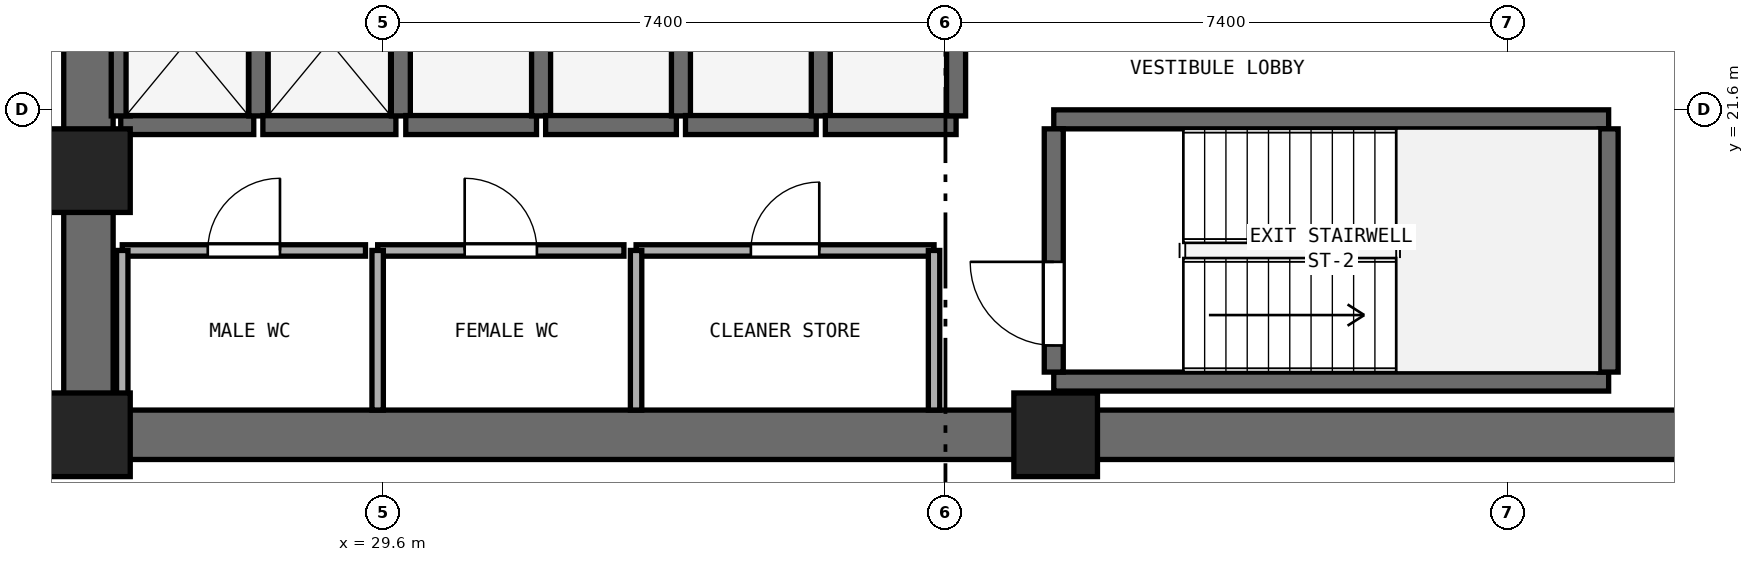
"""IFC4 building model, lengths in metres.
Left out: names, types, materials, properties, quantities, classifications, styles, units other than length and angle.
Written with IfcOpenShell. Run it as: python <this file> out.ifc"""

import sys

from ifc_helpers import new_model, si_unit, direction, frame, frame_2d, origin, origin_2d, place, context, subcontext, project, spatial, rectangle, extrude, element, fill, save


model = new_model("IFC4")
c1 = context("Model", 3, precision=1e-05, world=origin(), true_north=direction((0.0, 1.0)))
c2 = subcontext(c1, "Body", "Model", "MODEL_VIEW")
j1 = project(units=[si_unit("LENGTHUNIT", "METRE"), si_unit("PLANEANGLEUNIT", "RADIAN")], contexts=[c1])
p1 = place(None, origin())
s1 = spatial("IfcSite", under=j1, at=p1, CompositionType="ELEMENT")
p2 = place(p1, origin())
s2 = spatial("IfcBuilding", under=s1, at=p2, CompositionType="ELEMENT")
p3 = place(p2, frame((0.0, 0.0, 116.2)))
s3 = spatial("IfcBuildingStorey", under=s2, at=p3, CompositionType="ELEMENT", Elevation=116.2)
p4 = place(p3, frame((25.4, 17.325, 0.0), z_axis=(0.0, 0.0, 1.0), x_axis=(1.0, 0.0, 0.0)))
e1 = element("IfcWall", 1, at=p4, inside=s3, PredefinedType="SHEAR", context=c2, shape_type="SweptSolid", body=[
    extrude(rectangle(XDim=23.2, YDim=0.65, at=frame_2d((11.6, 0.0))), origin(), (0.0, 0.0, 1.0), 3.4),
])
p5 = place(p3, frame((25.725, 17.65, 0.0), z_axis=(0.0, 0.0, 1.0), x_axis=(0.0, 1.0, 0.0)))
e2 = element("IfcWall", 2, at=p5, inside=s3, PredefinedType="SHEAR", context=c2, shape_type="SweptSolid", body=[
    extrude(rectangle(XDim=15.1, YDim=0.65, at=frame_2d((7.55, 0.0))), origin(), (0.0, 0.0, 1.0), 3.4),
])
p6 = place(p5, frame((6.8, 0.0, 0.0)))
e3 = element("IfcOpeningElement", 3, at=p6, cuts=e2, PredefinedType="OPENING", context=c2, shape_type="SweptSolid", body=[
    extrude(rectangle(XDim=1.5, YDim=2.15, at=frame_2d((0.75, 1.075))), frame((0.0, 0.335, 0.0), z_axis=(0.0, -1.0, 0.0), x_axis=(1.0, 0.0, 0.0)), (0.0, 0.0, 1.0), 0.67),
])
for number, where, z_axis, x_axis in (
    (4, (25.725, 17.325, 0.0), (0.0, 0.0, 1.0), (1.0, 0.0, 0.0)),
    (5, (38.45, 17.325, 0.0), (0.0, 0.0, 1.0), (1.0, 0.0, 0.0)),
    (6, (25.725, 20.8, 0.0), (0.0, 0.0, 1.0), (1.0, 0.0, 0.0)),
):
    element("IfcColumn", number, at=place(p3, frame(where, z_axis=z_axis, x_axis=x_axis)), inside=s3, PredefinedType="PILASTER", context=c2, shape_type="SweptSolid", body=[
        extrude(rectangle(XDim=1.1, YDim=1.1, at=origin_2d()), origin(), (0.0, 0.0, 1.0), 3.8),
    ])
for number, where, z_axis, x_axis in (
    (7, (38.425, 18.025, 0.0), (0.0, 0.0, 1.0), (1.0, 0.0, 0.0)),
    (8, (38.425, 21.475, 0.0), (0.0, 0.0, 1.0), (1.0, 0.0, 0.0)),
):
    element("IfcWall", number, at=place(p3, frame(where, z_axis=z_axis, x_axis=x_axis)), inside=s3, PredefinedType="SHEAR", context=c2, shape_type="SweptSolid", body=[
        extrude(rectangle(XDim=7.3, YDim=0.25, at=frame_2d((3.65, 0.0))), origin(), (0.0, 0.0, 1.0), 3.4),
    ])
p7 = place(p3, frame((38.425, 18.15, 0.0), z_axis=(0.0, 0.0, 1.0), x_axis=(0.0, 1.0, 0.0)))
e9 = element("IfcWall", 9, at=p7, inside=s3, PredefinedType="SHEAR", context=c2, shape_type="SweptSolid", body=[
    extrude(rectangle(XDim=3.2, YDim=0.25, at=frame_2d((1.6, 0.0))), origin(), (0.0, 0.0, 1.0), 3.4),
])
p8 = place(p7, frame((0.35, 0.0, 0.0)))
e10 = element("IfcOpeningElement", 10, at=p8, cuts=e9, PredefinedType="OPENING", context=c2, shape_type="SweptSolid", body=[
    extrude(rectangle(XDim=1.1, YDim=2.15, at=frame_2d((0.55, 1.075))), frame((0.0, 0.135, 0.0), z_axis=(0.0, -1.0, 0.0), x_axis=(1.0, 0.0, 0.0)), (0.0, 0.0, 1.0), 0.27),
])
p9 = place(p3, frame((45.725, 18.15, 0.0), z_axis=(0.0, 0.0, 1.0), x_axis=(0.0, 1.0, 0.0)))
e11 = element("IfcWall", 11, at=p9, inside=s3, PredefinedType="SHEAR", context=c2, shape_type="SweptSolid", body=[
    extrude(rectangle(XDim=3.2, YDim=0.25, at=frame_2d((1.6, 0.0))), origin(), (0.0, 0.0, 1.0), 3.4),
])
p10 = place(p3, frame((26.15, 21.4, 0.0), z_axis=(0.0, 0.0, 1.0), x_axis=(1.0, 0.0, 0.0)))
e12 = element("IfcWall", 12, at=p10, inside=s3, PredefinedType="SHEAR", context=c2, shape_type="SweptSolid", body=[
    extrude(rectangle(XDim=1.75, YDim=0.25, at=frame_2d((0.875, 0.0))), origin(), (0.0, 0.0, 1.0), 3.4),
])
for number, where, z_axis, x_axis in (
    (13, (26.15, 21.52, 0.0), (0.0, 0.0, 1.0), (0.0, 1.0, 0.0)),
    (14, (27.96, 21.52, 0.0), (0.0, 0.0, 1.0), (0.0, 1.0, 0.0)),
):
    element("IfcWall", number, at=place(p3, frame(where, z_axis=z_axis, x_axis=x_axis)), inside=s3, PredefinedType="SHEAR", context=c2, shape_type="SweptSolid", body=[
        extrude(rectangle(XDim=1.96, YDim=0.25, at=frame_2d((0.98, 0.0))), origin(), (0.0, 0.0, 1.0), 3.4),
    ])
p11 = place(p3, frame((28.02, 21.4, 0.0), z_axis=(0.0, 0.0, 1.0), x_axis=(1.0, 0.0, 0.0)))
e15 = element("IfcWall", 15, at=p11, inside=s3, PredefinedType="SHEAR", context=c2, shape_type="SweptSolid", body=[
    extrude(rectangle(XDim=1.75, YDim=0.25, at=frame_2d((0.875, 0.0))), origin(), (0.0, 0.0, 1.0), 3.4),
])
p12 = place(p3, frame((29.835, 21.52, 0.0), z_axis=(0.0, 0.0, 1.0), x_axis=(0.0, 1.0, 0.0)))
e16 = element("IfcWall", 16, at=p12, inside=s3, PredefinedType="SHEAR", context=c2, shape_type="SweptSolid", body=[
    extrude(rectangle(XDim=1.96, YDim=0.25, at=frame_2d((0.98, 0.0))), origin(), (0.0, 0.0, 1.0), 3.4),
])
p13 = place(p3, frame((29.9, 21.4, 0.0), z_axis=(0.0, 0.0, 1.0), x_axis=(1.0, 0.0, 0.0)))
e17 = element("IfcWall", 17, at=p13, inside=s3, PredefinedType="SHEAR", context=c2, shape_type="SweptSolid", body=[
    extrude(rectangle(XDim=1.72, YDim=0.25, at=frame_2d((0.86, 0.0))), origin(), (0.0, 0.0, 1.0), 3.4),
])
p14 = place(p3, frame((31.68, 21.52, 0.0), z_axis=(0.0, 0.0, 1.0), x_axis=(0.0, 1.0, 0.0)))
e18 = element("IfcWall", 18, at=p14, inside=s3, PredefinedType="SHEAR", context=c2, shape_type="SweptSolid", body=[
    extrude(rectangle(XDim=1.96, YDim=0.25, at=frame_2d((0.98, 0.0))), origin(), (0.0, 0.0, 1.0), 3.4),
])
p15 = place(p3, frame((31.74, 21.4, 0.0), z_axis=(0.0, 0.0, 1.0), x_axis=(1.0, 0.0, 0.0)))
e19 = element("IfcWall", 19, at=p15, inside=s3, PredefinedType="SHEAR", context=c2, shape_type="SweptSolid", body=[
    extrude(rectangle(XDim=1.72, YDim=0.25, at=frame_2d((0.86, 0.0))), origin(), (0.0, 0.0, 1.0), 3.4),
])
p16 = place(p3, frame((33.52, 21.52, 0.0), z_axis=(0.0, 0.0, 1.0), x_axis=(0.0, 1.0, 0.0)))
e20 = element("IfcWall", 20, at=p16, inside=s3, PredefinedType="SHEAR", context=c2, shape_type="SweptSolid", body=[
    extrude(rectangle(XDim=1.96, YDim=0.25, at=frame_2d((0.98, 0.0))), origin(), (0.0, 0.0, 1.0), 3.4),
])
p17 = place(p3, frame((33.58, 21.4, 0.0), z_axis=(0.0, 0.0, 1.0), x_axis=(1.0, 0.0, 0.0)))
e21 = element("IfcWall", 21, at=p17, inside=s3, PredefinedType="SHEAR", context=c2, shape_type="SweptSolid", body=[
    extrude(rectangle(XDim=1.72, YDim=0.25, at=frame_2d((0.86, 0.0))), origin(), (0.0, 0.0, 1.0), 3.4),
])
p18 = place(p3, frame((35.36, 21.52, 0.0), z_axis=(0.0, 0.0, 1.0), x_axis=(0.0, 1.0, 0.0)))
e22 = element("IfcWall", 22, at=p18, inside=s3, PredefinedType="SHEAR", context=c2, shape_type="SweptSolid", body=[
    extrude(rectangle(XDim=1.96, YDim=0.25, at=frame_2d((0.98, 0.0))), origin(), (0.0, 0.0, 1.0), 3.4),
])
p19 = place(p3, frame((35.42, 21.4, 0.0), z_axis=(0.0, 0.0, 1.0), x_axis=(1.0, 0.0, 0.0)))
e23 = element("IfcWall", 23, at=p19, inside=s3, PredefinedType="SHEAR", context=c2, shape_type="SweptSolid", body=[
    extrude(rectangle(XDim=1.72, YDim=0.25, at=frame_2d((0.86, 0.0))), origin(), (0.0, 0.0, 1.0), 3.4),
])
p20 = place(p3, frame((37.14, 21.52, 0.0), z_axis=(0.0, 0.0, 1.0), x_axis=(0.0, 1.0, 0.0)))
e24 = element("IfcWall", 24, at=p20, inside=s3, PredefinedType="SHEAR", context=c2, shape_type="SweptSolid", body=[
    extrude(rectangle(XDim=1.96, YDim=0.25, at=frame_2d((0.98, 0.0))), origin(), (0.0, 0.0, 1.0), 3.4),
])
p21 = place(p3, frame((26.17, 19.75, 0.0), z_axis=(0.0, 0.0, 1.0), x_axis=(1.0, 0.0, 0.0)))
e25 = element("IfcWall", 25, at=p21, inside=s3, PredefinedType="PARTITIONING", context=c2, shape_type="SweptSolid", body=[
    extrude(rectangle(XDim=3.2, YDim=0.15, at=frame_2d((1.6, 0.0))), origin(), (0.0, 0.0, 1.0), 3.4),
])
p22 = place(p21, frame((1.125, 0.0, 0.0)))
e26 = element("IfcOpeningElement", 26, at=p22, cuts=e25, PredefinedType="OPENING", context=c2, shape_type="SweptSolid", body=[
    extrude(rectangle(XDim=0.95, YDim=2.1, at=frame_2d((0.475, 1.05))), frame((0.0, 0.085, 0.0), z_axis=(0.0, -1.0, 0.0), x_axis=(1.0, 0.0, 0.0)), (0.0, 0.0, 1.0), 0.17),
])
p23 = place(p3, frame((26.17, 17.65, 0.0), z_axis=(0.0, 0.0, 1.0), x_axis=(0.0, 1.0, 0.0)))
e27 = element("IfcWall", 27, at=p23, inside=s3, PredefinedType="PARTITIONING", context=c2, shape_type="SweptSolid", body=[
    extrude(rectangle(XDim=2.1, YDim=0.15, at=frame_2d((1.05, 0.0))), origin(), (0.0, 0.0, 1.0), 3.4),
])
p24 = place(p3, frame((29.53, 19.75, 0.0), z_axis=(0.0, 0.0, 1.0), x_axis=(1.0, 0.0, 0.0)))
e28 = element("IfcWall", 28, at=p24, inside=s3, PredefinedType="PARTITIONING", context=c2, shape_type="SweptSolid", body=[
    extrude(rectangle(XDim=3.24, YDim=0.15, at=frame_2d((1.62, 0.0))), origin(), (0.0, 0.0, 1.0), 3.4),
])
p25 = place(p24, frame((1.145, 0.0, 0.0)))
e29 = element("IfcOpeningElement", 29, at=p25, cuts=e28, PredefinedType="OPENING", context=c2, shape_type="SweptSolid", body=[
    extrude(rectangle(XDim=0.95, YDim=2.1, at=frame_2d((0.475, 1.05))), frame((0.0, 0.085, 0.0), z_axis=(0.0, -1.0, 0.0), x_axis=(1.0, 0.0, 0.0)), (0.0, 0.0, 1.0), 0.17),
])
p26 = place(p3, frame((29.53, 17.65, 0.0), z_axis=(0.0, 0.0, 1.0), x_axis=(0.0, 1.0, 0.0)))
e30 = element("IfcWall", 30, at=p26, inside=s3, PredefinedType="PARTITIONING", context=c2, shape_type="SweptSolid", body=[
    extrude(rectangle(XDim=2.1, YDim=0.15, at=frame_2d((1.05, 0.0))), origin(), (0.0, 0.0, 1.0), 3.4),
])
p27 = place(p3, frame((32.93, 19.75, 0.0), z_axis=(0.0, 0.0, 1.0), x_axis=(1.0, 0.0, 0.0)))
e31 = element("IfcWall", 31, at=p27, inside=s3, PredefinedType="PARTITIONING", context=c2, shape_type="SweptSolid", body=[
    extrude(rectangle(XDim=3.92, YDim=0.15, at=frame_2d((1.96, 0.0))), origin(), (0.0, 0.0, 1.0), 3.4),
])
p28 = place(p27, frame((1.51, 0.0, 0.0)))
e32 = element("IfcOpeningElement", 32, at=p28, cuts=e31, PredefinedType="OPENING", context=c2, shape_type="SweptSolid", body=[
    extrude(rectangle(XDim=0.9, YDim=2.1, at=frame_2d((0.45, 1.05))), frame((0.0, 0.085, 0.0), z_axis=(0.0, -1.0, 0.0), x_axis=(1.0, 0.0, 0.0)), (0.0, 0.0, 1.0), 0.17),
])
for number, where, z_axis, x_axis in (
    (33, (32.93, 17.65, 0.0), (0.0, 0.0, 1.0), (0.0, 1.0, 0.0)),
    (34, (36.85, 17.65, 0.0), (0.0, 0.0, 1.0), (0.0, 1.0, 0.0)),
):
    element("IfcWall", number, at=place(p3, frame(where, z_axis=z_axis, x_axis=x_axis)), inside=s3, PredefinedType="PARTITIONING", context=c2, shape_type="SweptSolid", body=[
        extrude(rectangle(XDim=2.1, YDim=0.15, at=frame_2d((1.05, 0.0))), origin(), (0.0, 0.0, 1.0), 3.4),
    ])
p29 = place(p8, origin())
e35 = element("IfcDoor", 35, at=p29, inside=s3, OperationType="SINGLE_SWING_RIGHT", PredefinedType="DOOR", context=c2, shape_type="SweptSolid", body=[
    extrude(rectangle(XDim=1.1, YDim=2.15, at=frame_2d((0.55, 1.075))), frame((0.0, 0.025, 0.0), z_axis=(0.0, -1.0, 0.0), x_axis=(1.0, 0.0, 0.0)), (0.0, 0.0, 1.0), 0.05),
])
fill(e10, e35)
p30 = place(p22, origin())
e36 = element("IfcDoor", 36, at=p30, inside=s3, OperationType="SINGLE_SWING_RIGHT", PredefinedType="DOOR", context=c2, shape_type="SweptSolid", body=[
    extrude(rectangle(XDim=0.95, YDim=2.1, at=frame_2d((0.475, 1.05))), frame((0.0, 0.025, 0.0), z_axis=(0.0, -1.0, 0.0), x_axis=(1.0, 0.0, 0.0)), (0.0, 0.0, 1.0), 0.05),
])
fill(e26, e36)
p31 = place(p25, origin())
e37 = element("IfcDoor", 37, at=p31, inside=s3, OperationType="SINGLE_SWING_LEFT", PredefinedType="DOOR", context=c2, shape_type="SweptSolid", body=[
    extrude(rectangle(XDim=0.95, YDim=2.1, at=frame_2d((0.475, 1.05))), frame((0.0, 0.025, 0.0), z_axis=(0.0, -1.0, 0.0), x_axis=(1.0, 0.0, 0.0)), (0.0, 0.0, 1.0), 0.05),
])
fill(e29, e37)
p32 = place(p28, origin())
e38 = element("IfcDoor", 38, at=p32, inside=s3, OperationType="SINGLE_SWING_RIGHT", PredefinedType="DOOR", context=c2, shape_type="SweptSolid", body=[
    extrude(rectangle(XDim=0.9, YDim=2.1, at=frame_2d((0.45, 1.05))), frame((0.0, 0.025, 0.0), z_axis=(0.0, -1.0, 0.0), x_axis=(1.0, 0.0, 0.0)), (0.0, 0.0, 1.0), 0.05),
])
fill(e32, e38)
save(model, sys.argv[1])
